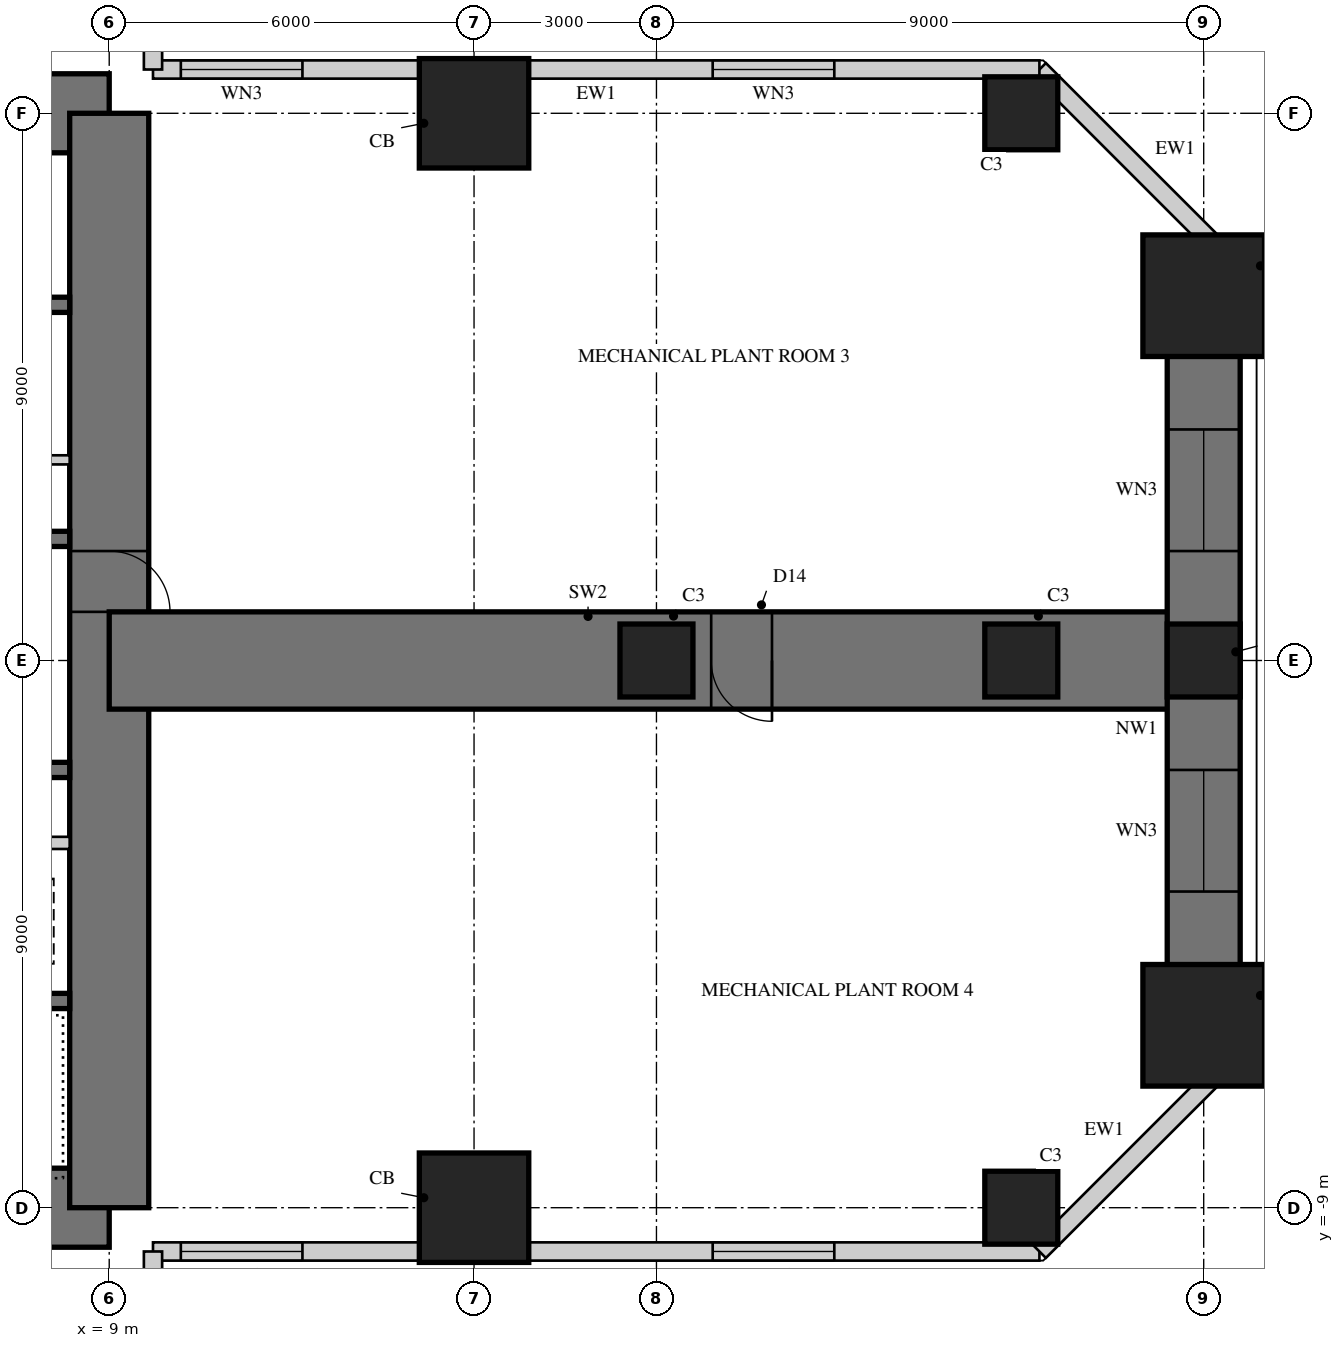
"""IFC4 building model, lengths in metres.
Left out: names, types, materials, properties, quantities, classifications, styles, units other than length and angle.
Written with IfcOpenShell. Run it as: python <this file> out.ifc"""

import sys

from ifc_helpers import new_model, si_unit, direction, frame, frame_2d, origin, origin_2d, place, context, subcontext, project, spatial, rectangle, hollow_rectangle, extrude, element, fill, save


model = new_model("IFC4")
c1 = context("Model", 3, precision=1e-05, world=origin(), true_north=direction((0.0, 1.0)))
c2 = subcontext(c1, "Body", "Model", "MODEL_VIEW")
j1 = project(units=[si_unit("LENGTHUNIT", "METRE"), si_unit("PLANEANGLEUNIT", "RADIAN")], contexts=[c1])
p1 = place(None, origin())
s1 = spatial("IfcSite", under=j1, at=p1, CompositionType="ELEMENT")
p2 = place(p1, origin())
s2 = spatial("IfcBuilding", under=s1, at=p2, CompositionType="ELEMENT")
p3 = place(p2, frame((0.0, 0.0, 18.5)))
s3 = spatial("IfcBuildingStorey", under=s2, at=p3, CompositionType="ELEMENT", Elevation=18.5)
p4 = place(p3, frame((9.0, 9.0, 0.0), z_axis=(0.0, 0.0, 1.0), x_axis=(-1.0, 0.0, 0.0)))
e1 = element("IfcWall", 1, at=p4, inside=s3, PredefinedType="SHEAR", context=c2, shape_type="SweptSolid", body=[
    extrude(rectangle(XDim=18.0, YDim=1.3, at=frame_2d((9.0, 0.0))), origin(), (0.0, 0.0, 1.0), 5.0),
])
p5 = place(p4, frame((9.8, 0.0, 0.0)))
e2 = element("IfcOpeningElement", 2, at=p5, cuts=e1, PredefinedType="OPENING", context=c2, shape_type="SweptSolid", body=[
    extrude(rectangle(XDim=1.0, YDim=2.4, at=frame_2d((0.5, 1.2))), frame((0.0, 0.66, 0.0), z_axis=(0.0, -1.0, 0.0), x_axis=(1.0, 0.0, 0.0)), (0.0, 0.0, 1.0), 1.32),
])
p6 = place(p3, frame((-9.0, -9.0, 0.0), z_axis=(0.0, 0.0, 1.0), x_axis=(1.0, 0.0, 0.0)))
e3 = element("IfcWall", 3, at=p6, inside=s3, PredefinedType="SHEAR", context=c2, shape_type="SweptSolid", body=[
    extrude(rectangle(XDim=18.0, YDim=1.3, at=frame_2d((9.0, 0.0))), origin(), (0.0, 0.0, 1.0), 5.0),
])
p7 = place(p6, frame((9.8, 0.0, 0.0)))
e4 = element("IfcOpeningElement", 4, at=p7, cuts=e3, PredefinedType="OPENING", context=c2, shape_type="SweptSolid", body=[
    extrude(rectangle(XDim=1.0, YDim=2.4, at=frame_2d((0.5, 1.2))), frame((0.0, 0.66, 0.0), z_axis=(0.0, -1.0, 0.0), x_axis=(1.0, 0.0, 0.0)), (0.0, 0.0, 1.0), 1.32),
])
p8 = place(p3, frame((9.0, -9.0, 0.0), z_axis=(0.0, 0.0, 1.0), x_axis=(0.0, 1.0, 0.0)))
e5 = element("IfcWall", 5, at=p8, inside=s3, PredefinedType="SHEAR", context=c2, shape_type="SweptSolid", body=[
    extrude(rectangle(XDim=18.0, YDim=1.3, at=frame_2d((9.0, 0.0))), origin(), (0.0, 0.0, 1.0), 5.0),
])
p9 = place(p8, frame((9.8, 0.0, 0.0)))
e6 = element("IfcOpeningElement", 6, at=p9, cuts=e5, PredefinedType="OPENING", context=c2, shape_type="SweptSolid", body=[
    extrude(rectangle(XDim=1.0, YDim=2.4, at=frame_2d((0.5, 1.2))), frame((0.0, 0.66, 0.0), z_axis=(0.0, -1.0, 0.0), x_axis=(1.0, 0.0, 0.0)), (0.0, 0.0, 1.0), 1.32),
])
for number, where, z_axis, x_axis in (
    (7, (1.925, 2.0, 0.0), (0.0, 0.0, 1.0), (1.0, 0.0, 0.0)),
    (8, (1.925, 5.85, 0.0), (0.0, 0.0, 1.0), (1.0, 0.0, 0.0)),
):
    element("IfcWall", number, at=place(p3, frame(where, z_axis=z_axis, x_axis=x_axis)), inside=s3, PredefinedType="SHEAR", context=c2, shape_type="SweptSolid", body=[
        extrude(rectangle(XDim=6.425, YDim=0.25, at=frame_2d((3.212, 0.0))), origin(), (0.0, 0.0, 1.0), 5.0),
    ])
p10 = place(p3, frame((1.925, 3.3, 0.0), z_axis=(0.0, 0.0, 1.0), x_axis=(1.0, 0.0, 0.0)))
e9 = element("IfcWall", 9, at=p10, inside=s3, PredefinedType="PARTITIONING", context=c2, shape_type="SweptSolid", body=[
    extrude(rectangle(XDim=6.425, YDim=0.15, at=frame_2d((3.212, 0.0))), origin(), (0.0, 0.0, 1.0), 5.0),
])
p11 = place(p10, frame((0.075, 0.0, 0.0)))
e10 = element("IfcOpeningElement", 10, at=p11, cuts=e9, PredefinedType="OPENING", context=c2, shape_type="SweptSolid", body=[
    extrude(rectangle(XDim=0.8, YDim=2.1, at=frame_2d((0.4, 1.05))), frame((0.0, 0.085, 0.0), z_axis=(0.0, -1.0, 0.0), x_axis=(1.0, 0.0, 0.0)), (0.0, 0.0, 1.0), 0.17),
])
p12 = place(p10, frame((3.675, 0.0, 0.0)))
e11 = element("IfcOpeningElement", 11, at=p12, cuts=e9, PredefinedType="OPENING", context=c2, shape_type="SweptSolid", body=[
    extrude(rectangle(XDim=0.8, YDim=2.1, at=frame_2d((0.4, 1.05))), frame((0.0, 0.085, 0.0), z_axis=(0.0, -1.0, 0.0), x_axis=(1.0, 0.0, 0.0)), (0.0, 0.0, 1.0), 0.17),
])
p13 = place(p3, frame((2.125, -1.8, 0.0), z_axis=(0.0, 0.0, 1.0), x_axis=(1.0, 0.0, 0.0)))
e12 = element("IfcWall", 12, at=p13, inside=s3, PredefinedType="SHEAR", context=c2, shape_type="SweptSolid", body=[
    extrude(rectangle(XDim=6.225, YDim=0.25, at=frame_2d((3.113, 0.0))), origin(), (0.0, 0.0, 1.0), 5.0),
])
p14 = place(p3, frame((2.125, -5.6, 0.0), z_axis=(0.0, 0.0, 1.0), x_axis=(1.0, 0.0, 0.0)))
e13 = element("IfcWall", 13, at=p14, inside=s3, PredefinedType="SHEAR", context=c2, shape_type="SweptSolid", body=[
    extrude(rectangle(XDim=6.225, YDim=0.25, at=frame_2d((3.113, 0.0))), origin(), (0.0, 0.0, 1.0), 5.0),
])
p15 = place(p14, frame((0.175, 0.0, 0.0)))
e14 = element("IfcOpeningElement", 14, at=p15, cuts=e13, PredefinedType="OPENING", context=c2, shape_type="SweptSolid", body=[
    extrude(rectangle(XDim=1.0, YDim=2.1, at=frame_2d((0.5, 1.05))), frame((0.0, 0.135, 0.0), z_axis=(0.0, -1.0, 0.0), x_axis=(1.0, 0.0, 0.0)), (0.0, 0.0, 1.0), 0.27),
])
p16 = place(p3, frame((5.725, -3.0, 0.0), z_axis=(0.0, 0.0, 1.0), x_axis=(1.0, 0.0, 0.0)))
e15 = element("IfcWall", 15, at=p16, inside=s3, PredefinedType="PARTITIONING", context=c2, shape_type="SweptSolid", body=[
    extrude(rectangle(XDim=2.625, YDim=0.2, at=frame_2d((1.312, 0.0))), origin(), (0.0, 0.0, 1.0), 5.0),
])
p17 = place(p3, frame((9.0, 0.0, 0.0), z_axis=(0.0, 0.0, 1.0), x_axis=(1.0, 0.0, 0.0)))
e16 = element("IfcWall", 16, at=p17, inside=s3, PredefinedType="SHEAR", context=c2, shape_type="SweptSolid", body=[
    extrude(rectangle(XDim=18.0, YDim=1.6, at=frame_2d((9.0, 0.0))), origin(), (0.0, 0.0, 1.0), 5.0),
])
p18 = place(p17, frame((9.9, 0.0, 0.0)))
e17 = element("IfcOpeningElement", 17, at=p18, cuts=e16, PredefinedType="OPENING", context=c2, shape_type="SweptSolid", body=[
    extrude(rectangle(XDim=1.0, YDim=2.2, at=frame_2d((0.5, 1.1))), frame((0.0, 0.81, 0.0), z_axis=(0.0, -1.0, 0.0), x_axis=(1.0, 0.0, 0.0)), (0.0, 0.0, 1.0), 1.62),
])
p19 = place(p3, frame((27.0, -6.0, 0.0), z_axis=(0.0, 0.0, 1.0), x_axis=(0.0, 1.0, 0.0)))
e18 = element("IfcWall", 18, at=p19, inside=s3, PredefinedType="SHEAR", context=c2, shape_type="SweptSolid", body=[
    extrude(rectangle(XDim=12.0, YDim=1.2, at=frame_2d((6.0, 0.0))), origin(), (0.0, 0.0, 1.0), 5.0),
])
p20 = place(p19, frame((2.2, 0.0, 0.8)))
e19 = element("IfcOpeningElement", 19, at=p20, cuts=e18, PredefinedType="OPENING", context=c2, shape_type="SweptSolid", body=[
    extrude(rectangle(XDim=2.0, YDim=2.5, at=frame_2d((1.0, 1.25))), frame((0.0, 0.61, 0.0), z_axis=(0.0, -1.0, 0.0), x_axis=(1.0, 0.0, 0.0)), (0.0, 0.0, 1.0), 1.22),
])
p21 = place(p19, frame((7.8, 0.0, 0.8)))
e20 = element("IfcOpeningElement", 20, at=p21, cuts=e18, PredefinedType="OPENING", context=c2, shape_type="SweptSolid", body=[
    extrude(rectangle(XDim=2.0, YDim=2.5, at=frame_2d((1.0, 1.25))), frame((0.0, 0.61, 0.0), z_axis=(0.0, -1.0, 0.0), x_axis=(1.0, 0.0, 0.0)), (0.0, 0.0, 1.0), 1.22),
])
p22 = place(p3, frame((15.0, -9.0, 0.0), z_axis=(0.0, 0.0, 1.0), x_axis=(1.0, 0.0, 0.0)))
e21 = element("IfcColumn", 21, at=p22, inside=s3, PredefinedType="COLUMN", context=c2, shape_type="SweptSolid", body=[
    extrude(rectangle(XDim=1.8, YDim=1.8, at=origin_2d()), origin(), (0.0, 0.0, 1.0), 5.0),
])
p23 = place(p3, frame((24.0, -9.0, 0.0), z_axis=(0.0, 0.0, 1.0), x_axis=(1.0, 0.0, 0.0)))
e22 = element("IfcColumn", 22, at=p23, inside=s3, PredefinedType="COLUMN", context=c2, shape_type="SweptSolid", body=[
    extrude(rectangle(XDim=1.2, YDim=1.2, at=origin_2d()), origin(), (0.0, 0.0, 1.0), 5.0),
])
p24 = place(p3, frame((15.0, 9.0, 0.0), z_axis=(0.0, 0.0, 1.0), x_axis=(1.0, 0.0, 0.0)))
e23 = element("IfcColumn", 23, at=p24, inside=s3, PredefinedType="COLUMN", context=c2, shape_type="SweptSolid", body=[
    extrude(rectangle(XDim=1.8, YDim=1.8, at=origin_2d()), origin(), (0.0, 0.0, 1.0), 5.0),
])
p25 = place(p3, frame((24.0, 9.0, 0.0), z_axis=(0.0, 0.0, 1.0), x_axis=(1.0, 0.0, 0.0)))
e24 = element("IfcColumn", 24, at=p25, inside=s3, PredefinedType="COLUMN", context=c2, shape_type="SweptSolid", body=[
    extrude(rectangle(XDim=1.2, YDim=1.2, at=origin_2d()), origin(), (0.0, 0.0, 1.0), 5.0),
])
p26 = place(p3, frame((27.0, -6.0, 0.0), z_axis=(0.0, 0.0, 1.0), x_axis=(1.0, 0.0, 0.0)))
e25 = element("IfcColumn", 25, at=p26, inside=s3, PredefinedType="COLUMN", context=c2, shape_type="SweptSolid", body=[
    extrude(rectangle(XDim=2.0, YDim=2.0, at=origin_2d()), origin(), (0.0, 0.0, 1.0), 5.0),
])
p27 = place(p3, frame((27.0, 0.0, 0.0), z_axis=(0.0, 0.0, 1.0), x_axis=(1.0, 0.0, 0.0)))
e26 = element("IfcColumn", 26, at=p27, inside=s3, PredefinedType="COLUMN", context=c2, shape_type="SweptSolid", body=[
    extrude(rectangle(XDim=1.2, YDim=1.2, at=origin_2d()), origin(), (0.0, 0.0, 1.0), 5.0),
])
p28 = place(p3, frame((27.0, 6.0, 0.0), z_axis=(0.0, 0.0, 1.0), x_axis=(1.0, 0.0, 0.0)))
e27 = element("IfcColumn", 27, at=p28, inside=s3, PredefinedType="COLUMN", context=c2, shape_type="SweptSolid", body=[
    extrude(rectangle(XDim=2.0, YDim=2.0, at=origin_2d()), origin(), (0.0, 0.0, 1.0), 5.0),
])
for number, where, z_axis, x_axis in (
    (28, (18.0, 0.0, 0.0), (0.0, 0.0, 1.0), (1.0, 0.0, 0.0)),
    (29, (24.0, 0.0, 0.0), (0.0, 0.0, 1.0), (1.0, 0.0, 0.0)),
):
    element("IfcColumn", number, at=place(p3, frame(where, z_axis=z_axis, x_axis=x_axis)), inside=s3, PredefinedType="COLUMN", context=c2, shape_type="SweptSolid", body=[
        extrude(rectangle(XDim=1.2, YDim=1.2, at=origin_2d()), origin(), (0.0, 0.0, 1.0), 5.0),
    ])
p29 = place(p3, frame((9.72, -9.72, 0.0), z_axis=(0.0, 0.0, 1.0), x_axis=(1.0, 0.0, 0.0)))
e30 = element("IfcWall", 30, at=p29, inside=s3, PredefinedType="SOLIDWALL", context=c2, shape_type="SweptSolid", body=[
    extrude(rectangle(XDim=14.578, YDim=0.3, at=frame_2d((7.289, 0.0))), origin(), (0.0, 0.0, 1.0), 4.8),
])
p30 = place(p29, frame((0.458, 0.0, 0.8)))
e31 = element("IfcOpeningElement", 31, at=p30, cuts=e30, PredefinedType="OPENING", context=c2, shape_type="SweptSolid", body=[
    extrude(rectangle(XDim=2.0, YDim=2.5, at=frame_2d((1.0, 1.25))), frame((0.0, 0.16, 0.0), z_axis=(0.0, -1.0, 0.0), x_axis=(1.0, 0.0, 0.0)), (0.0, 0.0, 1.0), 0.32),
])
p31 = place(p29, frame((9.205, 0.0, 0.8)))
e32 = element("IfcOpeningElement", 32, at=p31, cuts=e30, PredefinedType="OPENING", context=c2, shape_type="SweptSolid", body=[
    extrude(rectangle(XDim=2.0, YDim=2.5, at=frame_2d((1.0, 1.25))), frame((0.0, 0.16, 0.0), z_axis=(0.0, -1.0, 0.0), x_axis=(1.0, 0.0, 0.0)), (0.0, 0.0, 1.0), 0.32),
])
for number, where, z_axis, x_axis in (
    (33, (24.298, -9.72, 0.0), (0.0, 0.0, 1.0), (0.707, 0.707, 0.0)),
    (34, (27.6, 6.418, 0.0), (0.0, 0.0, 1.0), (-0.707, 0.707, 0.0)),
):
    element("IfcWall", number, at=place(p3, frame(where, z_axis=z_axis, x_axis=x_axis)), inside=s3, PredefinedType="SOLIDWALL", context=c2, shape_type="SweptSolid", body=[
        extrude(rectangle(XDim=4.669, YDim=0.3, at=frame_2d((2.335, 0.0))), origin(), (0.0, 0.0, 1.0), 4.8),
    ])
p32 = place(p3, frame((24.298, 9.72, 0.0), z_axis=(0.0, 0.0, 1.0), x_axis=(-1.0, 0.0, 0.0)))
e35 = element("IfcWall", 35, at=p32, inside=s3, PredefinedType="SOLIDWALL", context=c2, shape_type="SweptSolid", body=[
    extrude(rectangle(XDim=14.578, YDim=0.3, at=frame_2d((7.289, 0.0))), origin(), (0.0, 0.0, 1.0), 4.8),
])
p33 = place(p32, frame((3.374, 0.0, 0.8)))
e36 = element("IfcOpeningElement", 36, at=p33, cuts=e35, PredefinedType="OPENING", context=c2, shape_type="SweptSolid", body=[
    extrude(rectangle(XDim=2.0, YDim=2.5, at=frame_2d((1.0, 1.25))), frame((0.0, 0.16, 0.0), z_axis=(0.0, -1.0, 0.0), x_axis=(1.0, 0.0, 0.0)), (0.0, 0.0, 1.0), 0.32),
])
p34 = place(p32, frame((12.12, 0.0, 0.8)))
e37 = element("IfcOpeningElement", 37, at=p34, cuts=e35, PredefinedType="OPENING", context=c2, shape_type="SweptSolid", body=[
    extrude(rectangle(XDim=2.0, YDim=2.5, at=frame_2d((1.0, 1.25))), frame((0.0, 0.16, 0.0), z_axis=(0.0, -1.0, 0.0), x_axis=(1.0, 0.0, 0.0)), (0.0, 0.0, 1.0), 0.32),
])
p35 = place(p3, frame((9.72, 9.72, 0.0), z_axis=(0.0, 0.0, 1.0), x_axis=(0.0, 1.0, 0.0)))
e38 = element("IfcWall", 38, at=p35, inside=s3, PredefinedType="SOLIDWALL", context=c2, shape_type="SweptSolid", body=[
    extrude(rectangle(XDim=14.578, YDim=0.3, at=frame_2d((7.289, 0.0))), origin(), (0.0, 0.0, 1.0), 4.8),
])
p36 = place(p35, frame((0.458, 0.0, 0.8)))
e39 = element("IfcOpeningElement", 39, at=p36, cuts=e38, PredefinedType="OPENING", context=c2, shape_type="SweptSolid", body=[
    extrude(rectangle(XDim=2.0, YDim=2.5, at=frame_2d((1.0, 1.25))), frame((0.0, 0.16, 0.0), z_axis=(0.0, -1.0, 0.0), x_axis=(1.0, 0.0, 0.0)), (0.0, 0.0, 1.0), 0.32),
])
p37 = place(p35, frame((6.289, 0.0, 0.8)))
e40 = element("IfcOpeningElement", 40, at=p37, cuts=e38, PredefinedType="OPENING", context=c2, shape_type="SweptSolid", body=[
    extrude(rectangle(XDim=2.0, YDim=2.5, at=frame_2d((1.0, 1.25))), frame((0.0, 0.16, 0.0), z_axis=(0.0, -1.0, 0.0), x_axis=(1.0, 0.0, 0.0)), (0.0, 0.0, 1.0), 0.32),
])
p38 = place(p35, frame((9.205, 0.0, 0.8)))
e41 = element("IfcOpeningElement", 41, at=p38, cuts=e38, PredefinedType="OPENING", context=c2, shape_type="SweptSolid", body=[
    extrude(rectangle(XDim=2.0, YDim=2.5, at=frame_2d((1.0, 1.25))), frame((0.0, 0.16, 0.0), z_axis=(0.0, -1.0, 0.0), x_axis=(1.0, 0.0, 0.0)), (0.0, 0.0, 1.0), 0.32),
])
p39 = place(p3, frame((9.72, -24.298, 0.0), z_axis=(0.0, 0.0, 1.0), x_axis=(0.0, 1.0, 0.0)))
e42 = element("IfcWall", 42, at=p39, inside=s3, PredefinedType="SOLIDWALL", context=c2, shape_type="SweptSolid", body=[
    extrude(rectangle(XDim=14.578, YDim=0.3, at=frame_2d((7.289, 0.0))), origin(), (0.0, 0.0, 1.0), 4.8),
])
p40 = place(p39, frame((3.374, 0.0, 0.8)))
e43 = element("IfcOpeningElement", 43, at=p40, cuts=e42, PredefinedType="OPENING", context=c2, shape_type="SweptSolid", body=[
    extrude(rectangle(XDim=2.0, YDim=2.5, at=frame_2d((1.0, 1.25))), frame((0.0, 0.16, 0.0), z_axis=(0.0, -1.0, 0.0), x_axis=(1.0, 0.0, 0.0)), (0.0, 0.0, 1.0), 0.32),
])
p41 = place(p39, frame((12.12, 0.0, 0.8)))
e44 = element("IfcOpeningElement", 44, at=p41, cuts=e42, PredefinedType="OPENING", context=c2, shape_type="SweptSolid", body=[
    extrude(rectangle(XDim=2.0, YDim=2.5, at=frame_2d((1.0, 1.25))), frame((0.0, 0.16, 0.0), z_axis=(0.0, -1.0, 0.0), x_axis=(1.0, 0.0, 0.0)), (0.0, 0.0, 1.0), 0.32),
])
p42 = place(p30, origin())
e45 = element("IfcWindow", 45, at=p42, inside=s3, PartitioningType="SINGLE_PANEL", PredefinedType="WINDOW", context=c2, shape_type="SweptSolid", body=[
    extrude(hollow_rectangle(XDim=2.0, YDim=2.5, WallThickness=0.06, at=frame_2d((1.0, 1.25))), frame((0.0, 0.03, 0.0), z_axis=(0.0, -1.0, 0.0), x_axis=(1.0, 0.0, 0.0)), (0.0, 0.0, 1.0), 0.06),
    extrude(rectangle(XDim=1.879, YDim=2.379, at=frame_2d((1.0, 1.25))), frame((0.0, 0.03, 0.0), z_axis=(0.0, -1.0, 0.0), x_axis=(1.0, 0.0, 0.0)), (0.0, 0.0, 1.0), 0.06),
])
fill(e31, e45)
p43 = place(p31, origin())
e46 = element("IfcWindow", 46, at=p43, inside=s3, PartitioningType="SINGLE_PANEL", PredefinedType="WINDOW", context=c2, shape_type="SweptSolid", body=[
    extrude(hollow_rectangle(XDim=2.0, YDim=2.5, WallThickness=0.06, at=frame_2d((1.0, 1.25))), frame((0.0, 0.03, 0.0), z_axis=(0.0, -1.0, 0.0), x_axis=(1.0, 0.0, 0.0)), (0.0, 0.0, 1.0), 0.06),
    extrude(rectangle(XDim=1.879, YDim=2.379, at=frame_2d((1.0, 1.25))), frame((0.0, 0.03, 0.0), z_axis=(0.0, -1.0, 0.0), x_axis=(1.0, 0.0, 0.0)), (0.0, 0.0, 1.0), 0.06),
])
fill(e32, e46)
p44 = place(p20, origin())
e47 = element("IfcWindow", 47, at=p44, inside=s3, PartitioningType="SINGLE_PANEL", PredefinedType="WINDOW", context=c2, shape_type="SweptSolid", body=[
    extrude(hollow_rectangle(XDim=2.0, YDim=2.5, WallThickness=0.06, at=frame_2d((1.0, 1.25))), frame((0.0, 0.03, 0.0), z_axis=(0.0, -1.0, 0.0), x_axis=(1.0, 0.0, 0.0)), (0.0, 0.0, 1.0), 0.06),
    extrude(rectangle(XDim=1.879, YDim=2.379, at=frame_2d((1.0, 1.25))), frame((0.0, 0.03, 0.0), z_axis=(0.0, -1.0, 0.0), x_axis=(1.0, 0.0, 0.0)), (0.0, 0.0, 1.0), 0.06),
])
fill(e19, e47)
p45 = place(p21, origin())
e48 = element("IfcWindow", 48, at=p45, inside=s3, PartitioningType="SINGLE_PANEL", PredefinedType="WINDOW", context=c2, shape_type="SweptSolid", body=[
    extrude(hollow_rectangle(XDim=2.0, YDim=2.5, WallThickness=0.06, at=frame_2d((1.0, 1.25))), frame((0.0, 0.03, 0.0), z_axis=(0.0, -1.0, 0.0), x_axis=(1.0, 0.0, 0.0)), (0.0, 0.0, 1.0), 0.06),
    extrude(rectangle(XDim=1.879, YDim=2.379, at=frame_2d((1.0, 1.25))), frame((0.0, 0.03, 0.0), z_axis=(0.0, -1.0, 0.0), x_axis=(1.0, 0.0, 0.0)), (0.0, 0.0, 1.0), 0.06),
])
fill(e20, e48)
p46 = place(p33, origin())
e49 = element("IfcWindow", 49, at=p46, inside=s3, PartitioningType="SINGLE_PANEL", PredefinedType="WINDOW", context=c2, shape_type="SweptSolid", body=[
    extrude(hollow_rectangle(XDim=2.0, YDim=2.5, WallThickness=0.06, at=frame_2d((1.0, 1.25))), frame((0.0, 0.03, 0.0), z_axis=(0.0, -1.0, 0.0), x_axis=(1.0, 0.0, 0.0)), (0.0, 0.0, 1.0), 0.06),
    extrude(rectangle(XDim=1.879, YDim=2.379, at=frame_2d((1.0, 1.25))), frame((0.0, 0.03, 0.0), z_axis=(0.0, -1.0, 0.0), x_axis=(1.0, 0.0, 0.0)), (0.0, 0.0, 1.0), 0.06),
])
fill(e36, e49)
p47 = place(p34, origin())
e50 = element("IfcWindow", 50, at=p47, inside=s3, PartitioningType="SINGLE_PANEL", PredefinedType="WINDOW", context=c2, shape_type="SweptSolid", body=[
    extrude(hollow_rectangle(XDim=2.0, YDim=2.5, WallThickness=0.06, at=frame_2d((1.0, 1.25))), frame((0.0, 0.03, 0.0), z_axis=(0.0, -1.0, 0.0), x_axis=(1.0, 0.0, 0.0)), (0.0, 0.0, 1.0), 0.06),
    extrude(rectangle(XDim=1.879, YDim=2.379, at=frame_2d((1.0, 1.25))), frame((0.0, 0.03, 0.0), z_axis=(0.0, -1.0, 0.0), x_axis=(1.0, 0.0, 0.0)), (0.0, 0.0, 1.0), 0.06),
])
fill(e37, e50)
p48 = place(p18, frame((1.0, 0.0, 0.0), z_axis=(0.0, 0.0, 1.0), x_axis=(-1.0, 0.0, 0.0)))
e51 = element("IfcDoor", 51, at=p48, inside=s3, OperationType="SINGLE_SWING_LEFT", PredefinedType="DOOR", context=c2, shape_type="SweptSolid", body=[
    extrude(rectangle(XDim=1.0, YDim=2.2, at=frame_2d((0.5, 1.1))), frame((0.0, 0.025, 0.0), z_axis=(0.0, -1.0, 0.0), x_axis=(1.0, 0.0, 0.0)), (0.0, 0.0, 1.0), 0.05),
])
fill(e17, e51)
p49 = place(p9, frame((1.0, 0.0, 0.0), z_axis=(0.0, 0.0, 1.0), x_axis=(-1.0, 0.0, 0.0)))
e52 = element("IfcDoor", 52, at=p49, inside=s3, OperationType="SINGLE_SWING_RIGHT", PredefinedType="DOOR", context=c2, shape_type="SweptSolid", body=[
    extrude(rectangle(XDim=1.0, YDim=2.4, at=frame_2d((0.5, 1.2))), frame((0.0, -0.005, 0.0), z_axis=(0.0, -1.0, 0.0), x_axis=(1.0, 0.0, 0.0)), (0.0, 0.0, 1.0), 0.05),
])
fill(e6, e52)
save(model, sys.argv[1])
